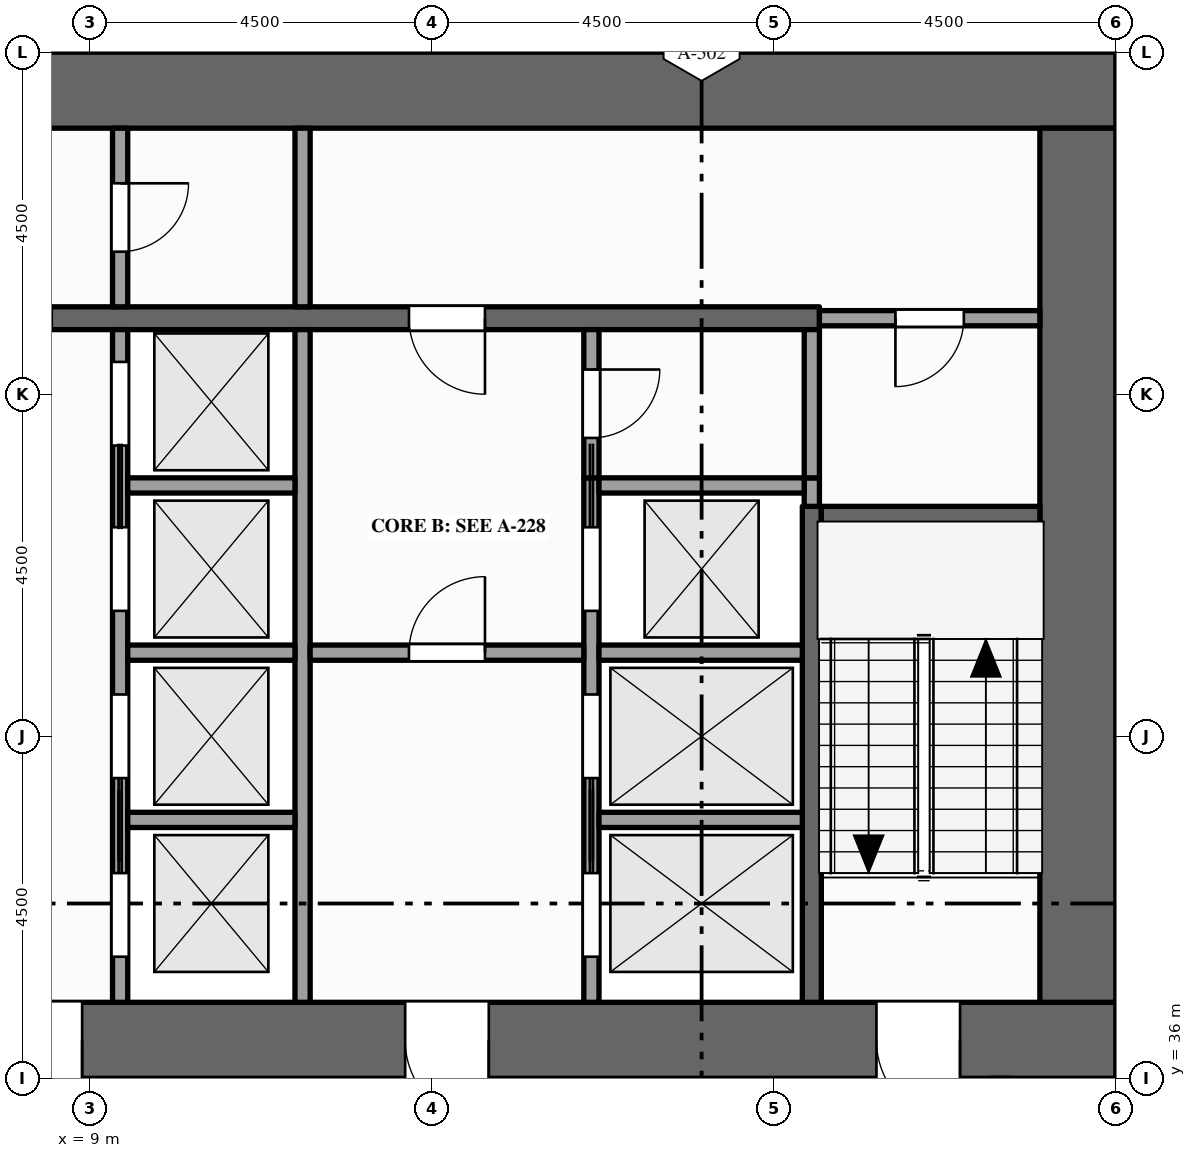
"""IFC4 building model, lengths in metres.
Left out: names, types, materials, properties, quantities, classifications, styles, units other than length and angle.
Written with IfcOpenShell. Run it as: python <this file> out.ifc"""

import sys

from ifc_helpers import new_model, si_unit, direction, frame, frame_2d, origin, place, context, subcontext, project, spatial, rectangle, extrude, element, fill, save


model = new_model("IFC4")
c1 = context("Model", 3, precision=1e-05, world=origin(), true_north=direction((0.0, 1.0)))
c2 = subcontext(c1, "Body", "Model", "MODEL_VIEW")
j1 = project(units=[si_unit("LENGTHUNIT", "METRE"), si_unit("PLANEANGLEUNIT", "RADIAN")], contexts=[c1])
p1 = place(None, origin())
s1 = spatial("IfcSite", under=j1, at=p1, CompositionType="ELEMENT")
p2 = place(p1, origin())
s2 = spatial("IfcBuilding", under=s1, at=p2, CompositionType="ELEMENT")
p3 = place(p2, frame((0.0, 0.0, 151.0)))
s3 = spatial("IfcBuildingStorey", under=s2, at=p3, CompositionType="ELEMENT", Elevation=151.0)
p4 = place(p3, frame((0.0, 36.5, -0.15), z_axis=(0.0, 0.0, 1.0), x_axis=(1.0, 0.0, 0.0)))
e1 = element("IfcWall", 1, at=p4, inside=s3, PredefinedType="SHEAR", context=c2, shape_type="SweptSolid", body=[
    extrude(rectangle(XDim=22.5, YDim=1.0, at=frame_2d((11.25, 0.0))), origin(), (0.0, 0.0, 1.0), 4.0),
])
p5 = place(p4, frame((7.1, 0.0, 0.15)))
e2 = element("IfcOpeningElement", 2, at=p5, cuts=e1, PredefinedType="OPENING", context=c2, shape_type="SweptSolid", body=[
    extrude(rectangle(XDim=1.8, YDim=2.1, at=frame_2d((0.9, 1.05))), frame((0.0, 0.51, 0.0), z_axis=(0.0, -1.0, 0.0), x_axis=(1.0, 0.0, 0.0)), (0.0, 0.0, 1.0), 1.02),
])
p6 = place(p4, frame((13.15, 0.0, 0.15)))
e3 = element("IfcOpeningElement", 3, at=p6, cuts=e1, PredefinedType="OPENING", context=c2, shape_type="SweptSolid", body=[
    extrude(rectangle(XDim=1.1, YDim=2.1, at=frame_2d((0.55, 1.05))), frame((0.0, 0.51, 0.0), z_axis=(0.0, -1.0, 0.0), x_axis=(1.0, 0.0, 0.0)), (0.0, 0.0, 1.0), 1.02),
])
p7 = place(p4, frame((2.15, 0.0, 0.15)))
e4 = element("IfcOpeningElement", 4, at=p7, cuts=e1, PredefinedType="OPENING", context=c2, shape_type="SweptSolid", body=[
    extrude(rectangle(XDim=1.1, YDim=2.1, at=frame_2d((0.55, 1.05))), frame((0.0, 0.51, 0.0), z_axis=(0.0, -1.0, 0.0), x_axis=(1.0, 0.0, 0.0)), (0.0, 0.0, 1.0), 1.02),
])
p8 = place(p4, frame((19.35, 0.0, 0.15)))
e5 = element("IfcOpeningElement", 5, at=p8, cuts=e1, PredefinedType="OPENING", context=c2, shape_type="SweptSolid", body=[
    extrude(rectangle(XDim=1.1, YDim=2.1, at=frame_2d((0.55, 1.05))), frame((0.0, 0.51, 0.0), z_axis=(0.0, -1.0, 0.0), x_axis=(1.0, 0.0, 0.0)), (0.0, 0.0, 1.0), 1.02),
])
p9 = place(p3, frame((0.0, 49.0, -0.15), z_axis=(0.0, 0.0, 1.0), x_axis=(1.0, 0.0, 0.0)))
e6 = element("IfcWall", 6, at=p9, inside=s3, PredefinedType="SHEAR", context=c2, shape_type="SweptSolid", body=[
    extrude(rectangle(XDim=22.5, YDim=1.0, at=frame_2d((11.25, 0.0))), origin(), (0.0, 0.0, 1.0), 4.0),
])
p10 = place(p3, frame((22.0, 37.0, -0.15), z_axis=(0.0, 0.0, 1.0), x_axis=(0.0, 1.0, 0.0)))
e7 = element("IfcWall", 7, at=p10, inside=s3, PredefinedType="SHEAR", context=c2, shape_type="SweptSolid", body=[
    extrude(rectangle(XDim=11.5, YDim=1.0, at=frame_2d((5.75, 0.0))), origin(), (0.0, 0.0, 1.0), 4.0),
])
p11 = place(p3, frame((9.4, 37.0, 0.0), z_axis=(0.0, 0.0, 1.0), x_axis=(0.0, 1.0, 0.0)))
e8 = element("IfcWall", 8, at=p11, inside=s3, PredefinedType="SOLIDWALL", context=c2, shape_type="SweptSolid", body=[
    extrude(rectangle(XDim=8.85, YDim=0.2, at=frame_2d((4.425, 0.0))), origin(), (0.0, 0.0, 1.0), 3.85),
])
p12 = place(p11, frame((0.6, 0.0, 0.012)))
e9 = element("IfcOpeningElement", 9, at=p12, cuts=e8, PredefinedType="OPENING", context=c2, shape_type="SweptSolid", body=[
    extrude(rectangle(XDim=1.1, YDim=2.1, at=frame_2d((0.55, 1.05))), frame((0.0, 0.11, 0.0), z_axis=(0.0, -1.0, 0.0), x_axis=(1.0, 0.0, 0.0)), (0.0, 0.0, 1.0), 0.22),
])
p13 = place(p11, frame((2.95, 0.0, 0.012)))
e10 = element("IfcOpeningElement", 10, at=p13, cuts=e8, PredefinedType="OPENING", context=c2, shape_type="SweptSolid", body=[
    extrude(rectangle(XDim=1.1, YDim=2.1, at=frame_2d((0.55, 1.05))), frame((0.0, 0.11, 0.0), z_axis=(0.0, -1.0, 0.0), x_axis=(1.0, 0.0, 0.0)), (0.0, 0.0, 1.0), 0.22),
])
p14 = place(p11, frame((5.15, 0.0, 0.012)))
e11 = element("IfcOpeningElement", 11, at=p14, cuts=e8, PredefinedType="OPENING", context=c2, shape_type="SweptSolid", body=[
    extrude(rectangle(XDim=1.1, YDim=2.1, at=frame_2d((0.55, 1.05))), frame((0.0, 0.11, 0.0), z_axis=(0.0, -1.0, 0.0), x_axis=(1.0, 0.0, 0.0)), (0.0, 0.0, 1.0), 0.22),
])
p15 = place(p11, frame((7.325, 0.0, 0.012)))
e12 = element("IfcOpeningElement", 12, at=p15, cuts=e8, PredefinedType="OPENING", context=c2, shape_type="SweptSolid", body=[
    extrude(rectangle(XDim=1.1, YDim=2.1, at=frame_2d((0.55, 1.05))), frame((0.0, 0.11, 0.0), z_axis=(0.0, -1.0, 0.0), x_axis=(1.0, 0.0, 0.0)), (0.0, 0.0, 1.0), 0.22),
])
p16 = place(p3, frame((9.4, 46.15, 0.0), z_axis=(0.0, 0.0, 1.0), x_axis=(0.0, 1.0, 0.0)))
e13 = element("IfcWall", 13, at=p16, inside=s3, PredefinedType="PARTITIONING", context=c2, shape_type="SweptSolid", body=[
    extrude(rectangle(XDim=2.35, YDim=0.2, at=frame_2d((1.175, 0.0))), origin(), (0.0, 0.0, 1.0), 3.85),
])
p17 = place(p16, frame((0.725, 0.0, 0.0)))
e14 = element("IfcOpeningElement", 14, at=p17, cuts=e13, PredefinedType="OPENING", context=c2, shape_type="SweptSolid", body=[
    extrude(rectangle(XDim=0.9, YDim=2.1, at=frame_2d((0.45, 1.05))), frame((0.0, 0.11, 0.0), z_axis=(0.0, -1.0, 0.0), x_axis=(1.0, 0.0, 0.0)), (0.0, 0.0, 1.0), 0.22),
])
p18 = place(p3, frame((11.8, 37.0, 0.0), z_axis=(0.0, 0.0, 1.0), x_axis=(0.0, 1.0, 0.0)))
e15 = element("IfcWall", 15, at=p18, inside=s3, PredefinedType="SOLIDWALL", context=c2, shape_type="SweptSolid", body=[
    extrude(rectangle(XDim=8.85, YDim=0.2, at=frame_2d((4.425, 0.0))), origin(), (0.0, 0.0, 1.0), 3.85),
])
p19 = place(p3, frame((11.8, 46.15, 0.0), z_axis=(0.0, 0.0, 1.0), x_axis=(0.0, 1.0, 0.0)))
e16 = element("IfcWall", 16, at=p19, inside=s3, PredefinedType="PARTITIONING", context=c2, shape_type="SweptSolid", body=[
    extrude(rectangle(XDim=2.35, YDim=0.2, at=frame_2d((1.175, 0.0))), origin(), (0.0, 0.0, 1.0), 3.85),
])
p20 = place(p3, frame((15.6, 37.0, 0.0), z_axis=(0.0, 0.0, 1.0), x_axis=(0.0, 1.0, 0.0)))
e17 = element("IfcWall", 17, at=p20, inside=s3, PredefinedType="SOLIDWALL", context=c2, shape_type="SweptSolid", body=[
    extrude(rectangle(XDim=6.9, YDim=0.2, at=frame_2d((3.45, 0.0))), origin(), (0.0, 0.0, 1.0), 3.85),
])
p21 = place(p20, frame((0.6, 0.0, 0.012)))
e18 = element("IfcOpeningElement", 18, at=p21, cuts=e17, PredefinedType="OPENING", context=c2, shape_type="SweptSolid", body=[
    extrude(rectangle(XDim=1.1, YDim=2.1, at=frame_2d((0.55, 1.05))), frame((0.0, 0.11, 0.0), z_axis=(0.0, -1.0, 0.0), x_axis=(1.0, 0.0, 0.0)), (0.0, 0.0, 1.0), 0.22),
])
p22 = place(p20, frame((2.95, 0.0, 0.012)))
e19 = element("IfcOpeningElement", 19, at=p22, cuts=e17, PredefinedType="OPENING", context=c2, shape_type="SweptSolid", body=[
    extrude(rectangle(XDim=1.1, YDim=2.1, at=frame_2d((0.55, 1.05))), frame((0.0, 0.11, 0.0), z_axis=(0.0, -1.0, 0.0), x_axis=(1.0, 0.0, 0.0)), (0.0, 0.0, 1.0), 0.22),
])
p23 = place(p20, frame((5.15, 0.0, 0.012)))
e20 = element("IfcOpeningElement", 20, at=p23, cuts=e17, PredefinedType="OPENING", context=c2, shape_type="SweptSolid", body=[
    extrude(rectangle(XDim=1.1, YDim=2.1, at=frame_2d((0.55, 1.05))), frame((0.0, 0.11, 0.0), z_axis=(0.0, -1.0, 0.0), x_axis=(1.0, 0.0, 0.0)), (0.0, 0.0, 1.0), 0.22),
])
p24 = place(p3, frame((15.6, 43.9, 0.0), z_axis=(0.0, 0.0, 1.0), x_axis=(0.0, 1.0, 0.0)))
e21 = element("IfcWall", 21, at=p24, inside=s3, PredefinedType="PARTITIONING", context=c2, shape_type="SweptSolid", body=[
    extrude(rectangle(XDim=1.95, YDim=0.2, at=frame_2d((0.975, 0.0))), origin(), (0.0, 0.0, 1.0), 3.85),
])
p25 = place(p24, frame((0.525, 0.0, 0.0)))
e22 = element("IfcOpeningElement", 22, at=p25, cuts=e21, PredefinedType="OPENING", context=c2, shape_type="SweptSolid", body=[
    extrude(rectangle(XDim=0.9, YDim=2.1, at=frame_2d((0.45, 1.05))), frame((0.0, 0.11, 0.0), z_axis=(0.0, -1.0, 0.0), x_axis=(1.0, 0.0, 0.0)), (0.0, 0.0, 1.0), 0.22),
])
p26 = place(p3, frame((18.5, 37.0, 0.0), z_axis=(0.0, 0.0, 1.0), x_axis=(0.0, 1.0, 0.0)))
e23 = element("IfcWall", 23, at=p26, inside=s3, PredefinedType="SHEAR", context=c2, shape_type="SweptSolid", body=[
    extrude(rectangle(XDim=6.525, YDim=0.25, at=frame_2d((3.262, 0.0))), origin(), (0.0, 0.0, 1.0), 3.85),
])
p27 = place(p3, frame((18.5, 43.525, 0.0), z_axis=(0.0, 0.0, 1.0), x_axis=(0.0, 1.0, 0.0)))
e24 = element("IfcWall", 24, at=p27, inside=s3, PredefinedType="SOLIDWALL", context=c2, shape_type="SweptSolid", body=[
    extrude(rectangle(XDim=0.375, YDim=0.2, at=frame_2d((0.188, 0.0))), origin(), (0.0, 0.0, 1.0), 3.85),
])
p28 = place(p3, frame((18.5, 43.9, 0.0), z_axis=(0.0, 0.0, 1.0), x_axis=(0.0, 1.0, 0.0)))
e25 = element("IfcWall", 25, at=p28, inside=s3, PredefinedType="PARTITIONING", context=c2, shape_type="SweptSolid", body=[
    extrude(rectangle(XDim=1.95, YDim=0.2, at=frame_2d((0.975, 0.0))), origin(), (0.0, 0.0, 1.0), 3.85),
])
p29 = place(p3, frame((9.5, 39.4, 0.0), z_axis=(0.0, 0.0, 1.0), x_axis=(1.0, 0.0, 0.0)))
e26 = element("IfcWall", 26, at=p29, inside=s3, PredefinedType="SOLIDWALL", context=c2, shape_type="SweptSolid", body=[
    extrude(rectangle(XDim=2.2, YDim=0.2, at=frame_2d((1.1, 0.0))), origin(), (0.0, 0.0, 1.0), 3.85),
])
p30 = place(p3, frame((15.7, 39.4, 0.0), z_axis=(0.0, 0.0, 1.0), x_axis=(1.0, 0.0, 0.0)))
e27 = element("IfcWall", 27, at=p30, inside=s3, PredefinedType="SOLIDWALL", context=c2, shape_type="SweptSolid", body=[
    extrude(rectangle(XDim=2.675, YDim=0.2, at=frame_2d((1.337, 0.0))), origin(), (0.0, 0.0, 1.0), 3.85),
])
p31 = place(p3, frame((9.5, 41.6, 0.0), z_axis=(0.0, 0.0, 1.0), x_axis=(1.0, 0.0, 0.0)))
e28 = element("IfcWall", 28, at=p31, inside=s3, PredefinedType="SOLIDWALL", context=c2, shape_type="SweptSolid", body=[
    extrude(rectangle(XDim=2.2, YDim=0.2, at=frame_2d((1.1, 0.0))), origin(), (0.0, 0.0, 1.0), 3.85),
])
p32 = place(p3, frame((11.9, 41.6, 0.0), z_axis=(0.0, 0.0, 1.0), x_axis=(1.0, 0.0, 0.0)))
e29 = element("IfcWall", 29, at=p32, inside=s3, PredefinedType="PARTITIONING", context=c2, shape_type="SweptSolid", body=[
    extrude(rectangle(XDim=3.6, YDim=0.2, at=frame_2d((1.8, 0.0))), origin(), (0.0, 0.0, 1.0), 3.85),
])
p33 = place(p32, frame((1.3, 0.0, 0.0)))
e30 = element("IfcOpeningElement", 30, at=p33, cuts=e29, PredefinedType="OPENING", context=c2, shape_type="SweptSolid", body=[
    extrude(rectangle(XDim=1.0, YDim=2.1, at=frame_2d((0.5, 1.05))), frame((0.0, 0.11, 0.0), z_axis=(0.0, -1.0, 0.0), x_axis=(1.0, 0.0, 0.0)), (0.0, 0.0, 1.0), 0.22),
])
p34 = place(p3, frame((15.7, 41.6, 0.0), z_axis=(0.0, 0.0, 1.0), x_axis=(1.0, 0.0, 0.0)))
e31 = element("IfcWall", 31, at=p34, inside=s3, PredefinedType="SOLIDWALL", context=c2, shape_type="SweptSolid", body=[
    extrude(rectangle(XDim=2.675, YDim=0.2, at=frame_2d((1.337, 0.0))), origin(), (0.0, 0.0, 1.0), 3.85),
])
p35 = place(p3, frame((18.625, 43.4, 0.0), z_axis=(0.0, 0.0, 1.0), x_axis=(1.0, 0.0, 0.0)))
e32 = element("IfcWall", 32, at=p35, inside=s3, PredefinedType="SHEAR", context=c2, shape_type="SweptSolid", body=[
    extrude(rectangle(XDim=2.875, YDim=0.25, at=frame_2d((1.438, 0.0))), origin(), (0.0, 0.0, 1.0), 3.85),
])
p36 = place(p3, frame((9.5, 43.8, 0.0), z_axis=(0.0, 0.0, 1.0), x_axis=(1.0, 0.0, 0.0)))
e33 = element("IfcWall", 33, at=p36, inside=s3, PredefinedType="SOLIDWALL", context=c2, shape_type="SweptSolid", body=[
    extrude(rectangle(XDim=2.2, YDim=0.2, at=frame_2d((1.1, 0.0))), origin(), (0.0, 0.0, 1.0), 3.85),
])
p37 = place(p3, frame((15.7, 43.8, 0.0), z_axis=(0.0, 0.0, 1.0), x_axis=(1.0, 0.0, 0.0)))
e34 = element("IfcWall", 34, at=p37, inside=s3, PredefinedType="SOLIDWALL", context=c2, shape_type="SweptSolid", body=[
    extrude(rectangle(XDim=2.7, YDim=0.2, at=frame_2d((1.35, 0.0))), origin(), (0.0, 0.0, 1.0), 3.85),
])
p38 = place(p3, frame((4.1, 46.0, 0.0), z_axis=(0.0, 0.0, 1.0), x_axis=(1.0, 0.0, 0.0)))
e35 = element("IfcWall", 35, at=p38, inside=s3, PredefinedType="SHEAR", context=c2, shape_type="SweptSolid", body=[
    extrude(rectangle(XDim=14.5, YDim=0.3, at=frame_2d((7.25, 0.0))), origin(), (0.0, 0.0, 1.0), 3.85),
])
p39 = place(p38, frame((3.4, 0.0, 0.0)))
e36 = element("IfcOpeningElement", 36, at=p39, cuts=e35, PredefinedType="OPENING", context=c2, shape_type="SweptSolid", body=[
    extrude(rectangle(XDim=1.0, YDim=2.1, at=frame_2d((0.5, 1.05))), frame((0.0, 0.16, 0.0), z_axis=(0.0, -1.0, 0.0), x_axis=(1.0, 0.0, 0.0)), (0.0, 0.0, 1.0), 0.32),
])
p40 = place(p38, frame((9.1, 0.0, 0.0)))
e37 = element("IfcOpeningElement", 37, at=p40, cuts=e35, PredefinedType="OPENING", context=c2, shape_type="SweptSolid", body=[
    extrude(rectangle(XDim=1.0, YDim=2.1, at=frame_2d((0.5, 1.05))), frame((0.0, 0.16, 0.0), z_axis=(0.0, -1.0, 0.0), x_axis=(1.0, 0.0, 0.0)), (0.0, 0.0, 1.0), 0.32),
])
p41 = place(p3, frame((18.6, 46.0, 0.0), z_axis=(0.0, 0.0, 1.0), x_axis=(1.0, 0.0, 0.0)))
e38 = element("IfcWall", 38, at=p41, inside=s3, PredefinedType="PARTITIONING", context=c2, shape_type="SweptSolid", body=[
    extrude(rectangle(XDim=2.9, YDim=0.2, at=frame_2d((1.45, 0.0))), origin(), (0.0, 0.0, 1.0), 3.85),
])
p42 = place(p41, frame((1.0, 0.0, 0.0)))
e39 = element("IfcOpeningElement", 39, at=p42, cuts=e38, PredefinedType="OPENING", context=c2, shape_type="SweptSolid", body=[
    extrude(rectangle(XDim=0.9, YDim=2.1, at=frame_2d((0.45, 1.05))), frame((0.0, 0.11, 0.0), z_axis=(0.0, -1.0, 0.0), x_axis=(1.0, 0.0, 0.0)), (0.0, 0.0, 1.0), 0.22),
])
p43 = place(p12, origin())
e40 = element("IfcDoor", 40, at=p43, inside=s3, OperationType="SLIDING_TO_RIGHT", PredefinedType="DOOR", context=c2, shape_type="SweptSolid", body=[
    extrude(rectangle(XDim=1.1, YDim=2.1, at=frame_2d((0.55, 1.05))), frame((0.0, 0.025, 0.0), z_axis=(0.0, -1.0, 0.0), x_axis=(1.0, 0.0, 0.0)), (0.0, 0.0, 1.0), 0.05),
])
fill(e9, e40)
p44 = place(p13, origin())
e41 = element("IfcDoor", 41, at=p44, inside=s3, OperationType="SLIDING_TO_LEFT", PredefinedType="DOOR", context=c2, shape_type="SweptSolid", body=[
    extrude(rectangle(XDim=1.1, YDim=2.1, at=frame_2d((0.55, 1.05))), frame((0.0, 0.025, 0.0), z_axis=(0.0, -1.0, 0.0), x_axis=(1.0, 0.0, 0.0)), (0.0, 0.0, 1.0), 0.05),
])
fill(e10, e41)
p45 = place(p14, origin())
e42 = element("IfcDoor", 42, at=p45, inside=s3, OperationType="SLIDING_TO_RIGHT", PredefinedType="DOOR", context=c2, shape_type="SweptSolid", body=[
    extrude(rectangle(XDim=1.1, YDim=2.1, at=frame_2d((0.55, 1.05))), frame((0.0, 0.025, 0.0), z_axis=(0.0, -1.0, 0.0), x_axis=(1.0, 0.0, 0.0)), (0.0, 0.0, 1.0), 0.05),
])
fill(e11, e42)
p46 = place(p15, origin())
e43 = element("IfcDoor", 43, at=p46, inside=s3, OperationType="SLIDING_TO_LEFT", PredefinedType="DOOR", context=c2, shape_type="SweptSolid", body=[
    extrude(rectangle(XDim=1.1, YDim=2.1, at=frame_2d((0.55, 1.05))), frame((0.0, 0.025, 0.0), z_axis=(0.0, -1.0, 0.0), x_axis=(1.0, 0.0, 0.0)), (0.0, 0.0, 1.0), 0.05),
])
fill(e12, e43)
p47 = place(p21, origin())
e44 = element("IfcDoor", 44, at=p47, inside=s3, OperationType="SLIDING_TO_RIGHT", PredefinedType="DOOR", context=c2, shape_type="SweptSolid", body=[
    extrude(rectangle(XDim=1.1, YDim=2.1, at=frame_2d((0.55, 1.05))), frame((0.0, 0.025, 0.0), z_axis=(0.0, -1.0, 0.0), x_axis=(1.0, 0.0, 0.0)), (0.0, 0.0, 1.0), 0.05),
])
fill(e18, e44)
p48 = place(p22, origin())
e45 = element("IfcDoor", 45, at=p48, inside=s3, OperationType="SLIDING_TO_LEFT", PredefinedType="DOOR", context=c2, shape_type="SweptSolid", body=[
    extrude(rectangle(XDim=1.1, YDim=2.1, at=frame_2d((0.55, 1.05))), frame((0.0, 0.025, 0.0), z_axis=(0.0, -1.0, 0.0), x_axis=(1.0, 0.0, 0.0)), (0.0, 0.0, 1.0), 0.05),
])
fill(e19, e45)
p49 = place(p23, origin())
e46 = element("IfcDoor", 46, at=p49, inside=s3, OperationType="SLIDING_TO_RIGHT", PredefinedType="DOOR", context=c2, shape_type="SweptSolid", body=[
    extrude(rectangle(XDim=1.1, YDim=2.1, at=frame_2d((0.55, 1.05))), frame((0.0, 0.025, 0.0), z_axis=(0.0, -1.0, 0.0), x_axis=(1.0, 0.0, 0.0)), (0.0, 0.0, 1.0), 0.05),
])
fill(e20, e46)
p50 = place(p5, origin())
e47 = element("IfcDoor", 47, at=p50, inside=s3, OperationType="DOUBLE_DOOR_SINGLE_SWING", PredefinedType="DOOR", context=c2, shape_type="SweptSolid", body=[
    extrude(rectangle(XDim=1.8, YDim=2.1, at=frame_2d((0.9, 1.05))), frame((0.0, 0.025, 0.0), z_axis=(0.0, -1.0, 0.0), x_axis=(1.0, 0.0, 0.0)), (0.0, 0.0, 1.0), 0.05),
])
fill(e2, e47)
p51 = place(p6, origin())
e48 = element("IfcDoor", 48, at=p51, inside=s3, OperationType="SINGLE_SWING_RIGHT", PredefinedType="DOOR", context=c2, shape_type="SweptSolid", body=[
    extrude(rectangle(XDim=1.1, YDim=2.1, at=frame_2d((0.55, 1.05))), frame((0.0, 0.025, 0.0), z_axis=(0.0, -1.0, 0.0), x_axis=(1.0, 0.0, 0.0)), (0.0, 0.0, 1.0), 0.05),
])
fill(e3, e48)
p52 = place(p33, origin())
e49 = element("IfcDoor", 49, at=p52, inside=s3, OperationType="SINGLE_SWING_RIGHT", PredefinedType="DOOR", context=c2, shape_type="SweptSolid", body=[
    extrude(rectangle(XDim=1.0, YDim=2.1, at=frame_2d((0.5, 1.05))), frame((0.0, 0.025, 0.0), z_axis=(0.0, -1.0, 0.0), x_axis=(1.0, 0.0, 0.0)), (0.0, 0.0, 1.0), 0.05),
])
fill(e30, e49)
p53 = place(p40, origin())
e50 = element("IfcDoor", 50, at=p53, inside=s3, OperationType="SINGLE_SWING_RIGHT", PredefinedType="DOOR", context=c2, shape_type="SweptSolid", body=[
    extrude(rectangle(XDim=1.0, YDim=2.1, at=frame_2d((0.5, 1.05))), frame((0.0, 0.025, 0.0), z_axis=(0.0, -1.0, 0.0), x_axis=(1.0, 0.0, 0.0)), (0.0, 0.0, 1.0), 0.05),
])
fill(e37, e50)
p54 = place(p17, origin())
e51 = element("IfcDoor", 51, at=p54, inside=s3, OperationType="SINGLE_SWING_RIGHT", PredefinedType="DOOR", context=c2, shape_type="SweptSolid", body=[
    extrude(rectangle(XDim=0.9, YDim=2.1, at=frame_2d((0.45, 1.05))), frame((0.0, 0.025, 0.0), z_axis=(0.0, -1.0, 0.0), x_axis=(1.0, 0.0, 0.0)), (0.0, 0.0, 1.0), 0.05),
])
fill(e14, e51)
p55 = place(p8, origin())
e52 = element("IfcDoor", 52, at=p55, inside=s3, OperationType="SINGLE_SWING_RIGHT", PredefinedType="DOOR", context=c2, shape_type="SweptSolid", body=[
    extrude(rectangle(XDim=1.1, YDim=2.1, at=frame_2d((0.55, 1.05))), frame((0.0, 0.025, 0.0), z_axis=(0.0, -1.0, 0.0), x_axis=(1.0, 0.0, 0.0)), (0.0, 0.0, 1.0), 0.05),
])
fill(e5, e52)
p56 = place(p42, origin())
e53 = element("IfcDoor", 53, at=p56, inside=s3, OperationType="SINGLE_SWING_LEFT", PredefinedType="DOOR", context=c2, shape_type="SweptSolid", body=[
    extrude(rectangle(XDim=0.9, YDim=2.1, at=frame_2d((0.45, 1.05))), frame((0.0, 0.025, 0.0), z_axis=(0.0, -1.0, 0.0), x_axis=(1.0, 0.0, 0.0)), (0.0, 0.0, 1.0), 0.05),
])
fill(e39, e53)
p57 = place(p25, origin())
e54 = element("IfcDoor", 54, at=p57, inside=s3, OperationType="SINGLE_SWING_RIGHT", PredefinedType="DOOR", context=c2, shape_type="SweptSolid", body=[
    extrude(rectangle(XDim=0.9, YDim=2.1, at=frame_2d((0.45, 1.05))), frame((0.0, 0.025, 0.0), z_axis=(0.0, -1.0, 0.0), x_axis=(1.0, 0.0, 0.0)), (0.0, 0.0, 1.0), 0.05),
])
fill(e22, e54)
save(model, sys.argv[1])
